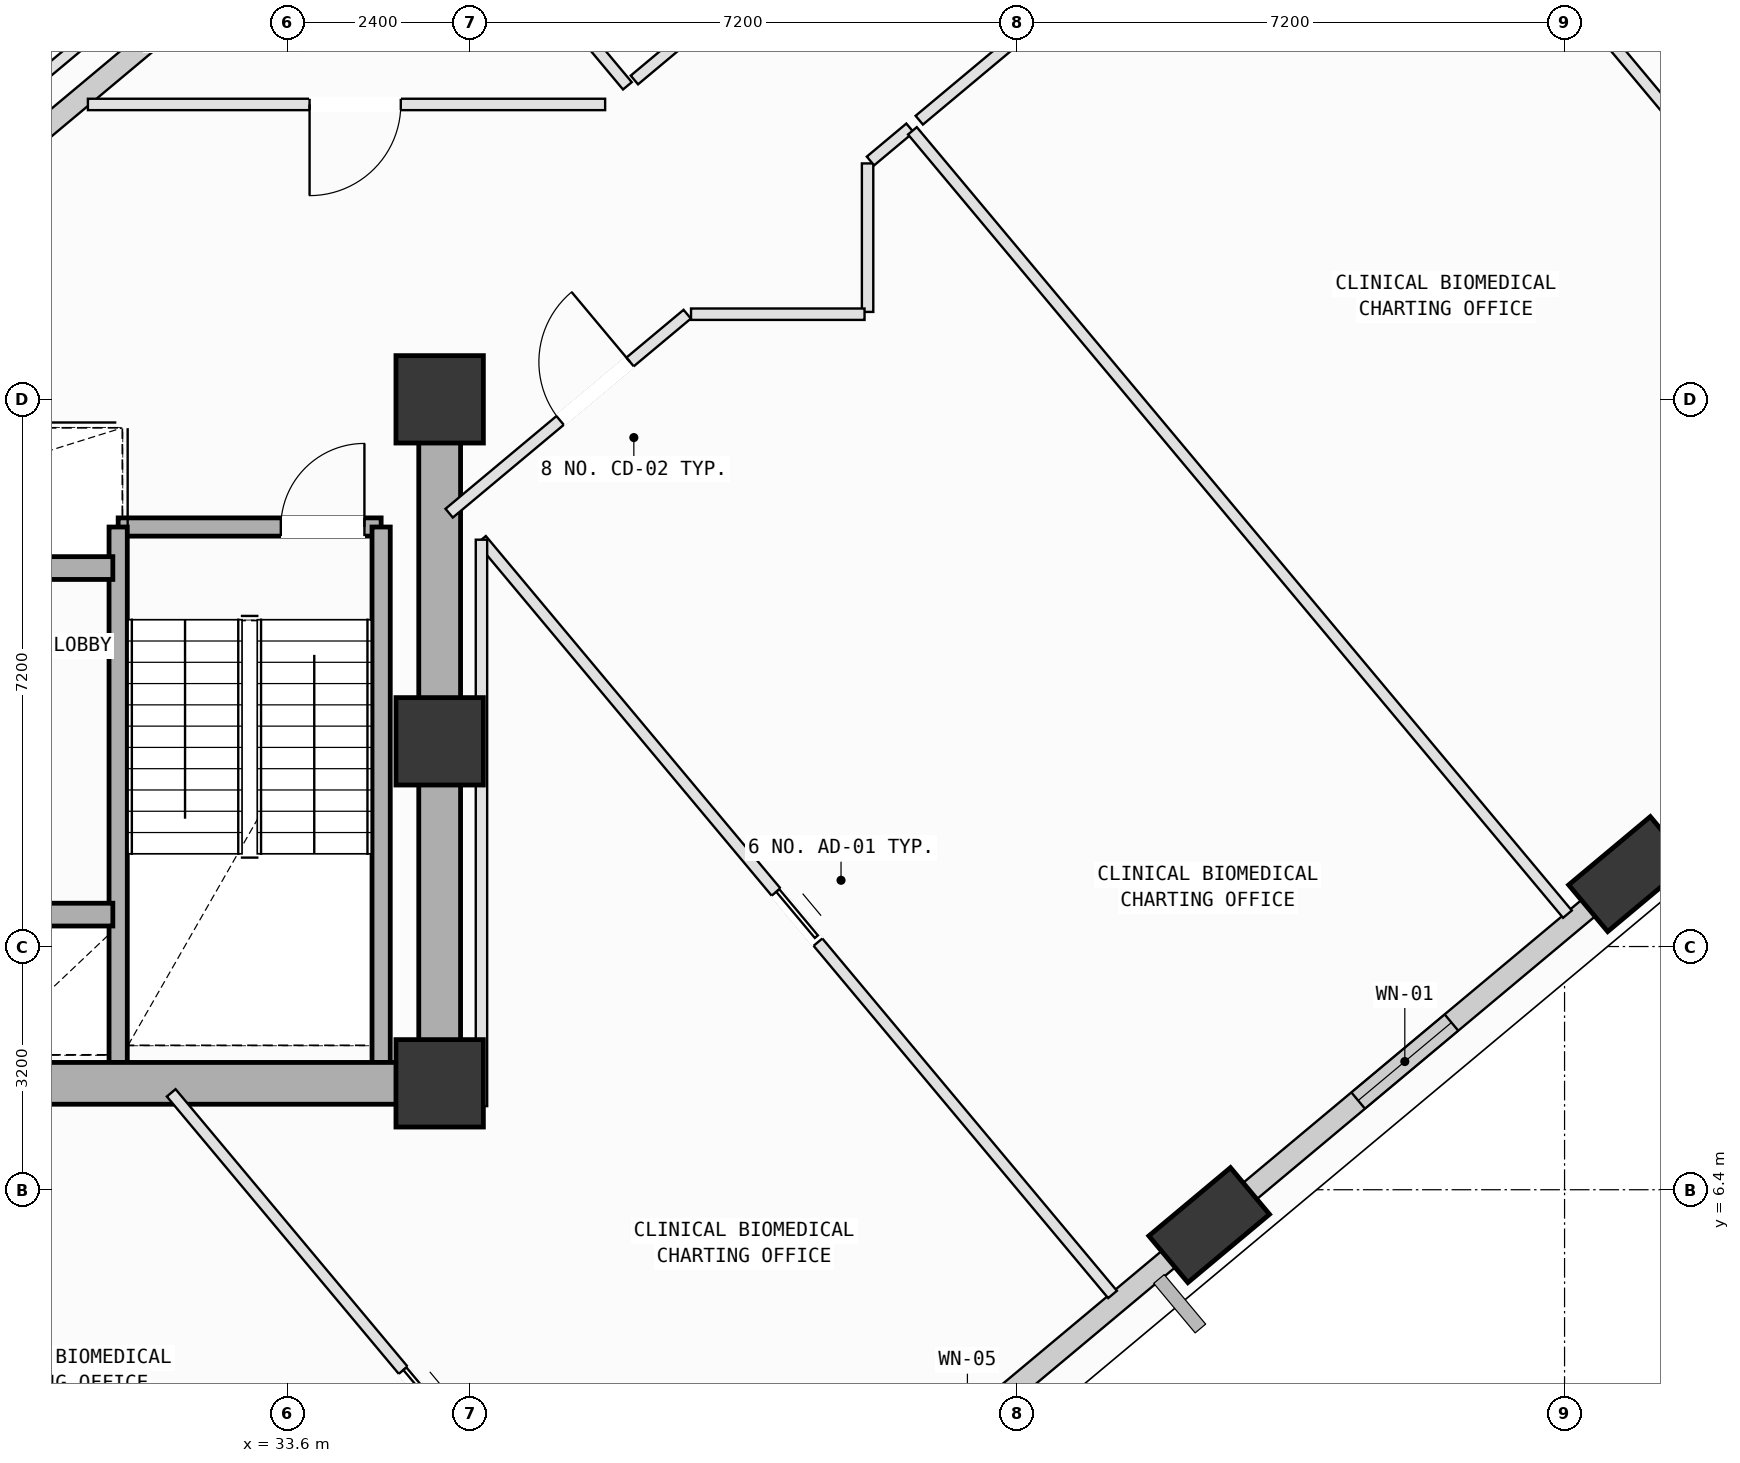
"""IFC4 building model, lengths in metres.
Left out: names, types, materials, properties, quantities, classifications, styles, units other than length and angle.
Written with IfcOpenShell. Run it as: python <this file> out.ifc"""

import sys

from ifc_helpers import new_model, si_unit, direction, frame, frame_2d, origin, origin_2d, place, context, subcontext, project, spatial, rectangle, extrude, element, fill, save


model = new_model("IFC4")
c1 = context("Model", 3, precision=1e-05, world=origin(), true_north=direction((0.0, 1.0)))
c2 = subcontext(c1, "Body", "Model", "MODEL_VIEW")
j1 = project(units=[si_unit("LENGTHUNIT", "METRE"), si_unit("PLANEANGLEUNIT", "RADIAN")], contexts=[c1])
p1 = place(None, origin())
s1 = spatial("IfcSite", under=j1, at=p1, CompositionType="ELEMENT")
p2 = place(p1, origin())
s2 = spatial("IfcBuilding", under=s1, at=p2, CompositionType="ELEMENT")
p3 = place(p2, frame((0.0, 0.0, 193.8)))
s3 = spatial("IfcBuildingStorey", under=s2, at=p3, CompositionType="ELEMENT", Elevation=193.8)
for number, where, z_axis, x_axis in (
    (1, (35.6, 7.8, 0.0), (0.0, 0.0, 1.0), (1.0, 0.0, 0.0)),
    (2, (35.6, 12.3, 0.0), (0.0, 0.0, 1.0), (1.0, 0.0, 0.0)),
    (3, (35.6, 16.8, 0.0), (0.0, 0.0, 1.0), (1.0, 0.0, 0.0)),
):
    element("IfcColumn", number, at=place(p3, frame(where, z_axis=z_axis, x_axis=x_axis)), inside=s3, PredefinedType="COLUMN", context=c2, shape_type="SweptSolid", body=[
        extrude(rectangle(XDim=1.15, YDim=1.15, at=origin_2d()), origin(), (0.0, 0.0, 1.0), 4.0),
    ])
p4 = place(p3, frame((45.724, 5.935, 0.002), z_axis=(0.077435241864, 0.050670507834, 0.995708934857), x_axis=(-0.954505911001, 0.292223987972, 0.05935997573)))
e4 = element("IfcColumn", 4, at=p4, inside=s3, PredefinedType="COLUMN", context=c2, shape_type="SweptSolid", body=[
    extrude(rectangle(XDim=1.4, YDim=0.8, at=origin_2d()), origin(), (0.0, 0.0, 1.0), 4.014),
])
p5 = place(p3, frame((51.248, 10.553, 0.002), z_axis=(0.058207280613, 0.073352121651, 0.995606035906), x_axis=(-0.99792031094, -0.023390957451, 0.060065931471)))
e5 = element("IfcColumn", 5, at=p5, inside=s3, PredefinedType="COLUMN", context=c2, shape_type="SweptSolid", body=[
    extrude(rectangle(XDim=1.4, YDim=0.8, at=origin_2d()), origin(), (0.0, 0.0, 1.0), 4.014),
])
p6 = place(p3, frame((45.486, 5.735, 0.0), z_axis=(0.0, 0.0, 1.0), x_axis=(-0.767147873107, -0.641470296107, 0.0)))
e6 = element("IfcWall", 6, at=p6, inside=s3, PredefinedType="SOLIDWALL", context=c2, shape_type="SweptSolid", body=[
    extrude(rectangle(XDim=6.214, YDim=0.28, at=frame_2d((3.107, 0.0))), origin(), (0.0, 0.0, 1.0), 3.265),
])
p7 = place(p6, frame((3.235, 0.0, 0.75)))
e7 = element("IfcOpeningElement", 7, at=p7, cuts=e6, PredefinedType="OPENING", context=c2, shape_type="SweptSolid", body=[
    extrude(rectangle(XDim=1.2, YDim=1.75, at=frame_2d((0.6, 0.875))), frame((0.0, 0.15, 0.0), z_axis=(0.0, -1.0, 0.0), x_axis=(1.0, 0.0, 0.0)), (0.0, 0.0, 1.0), 0.3),
])
p8 = place(p3, frame((51.01, 10.354, 0.0), z_axis=(0.0, 0.0, 1.0), x_axis=(-0.767179241659, -0.641432779929, 0.0)))
e8 = element("IfcWall", 8, at=p8, inside=s3, PredefinedType="SOLIDWALL", context=c2, shape_type="SweptSolid", body=[
    extrude(rectangle(XDim=6.209, YDim=0.28, at=frame_2d((3.104, 0.0))), origin(), (0.0, 0.0, 1.0), 3.265),
])
p9 = place(p8, frame((2.734, 0.0, 0.75)))
e9 = element("IfcOpeningElement", 9, at=p9, cuts=e8, PredefinedType="OPENING", context=c2, shape_type="SweptSolid", body=[
    extrude(rectangle(XDim=1.6, YDim=1.95, at=frame_2d((0.8, 0.975))), frame((0.0, 0.15, 0.0), z_axis=(0.0, -1.0, 0.0), x_axis=(1.0, 0.0, 0.0)), (0.0, 0.0, 1.0), 0.3),
])
p10 = place(p3, frame((29.828, 19.887, 0.0), z_axis=(0.0, 0.0, 1.0), x_axis=(0.767165929265, 0.641448701749, 0.0)))
e10 = element("IfcWall", 10, at=p10, inside=s3, PredefinedType="SOLIDWALL", context=c2, shape_type="SweptSolid", body=[
    extrude(rectangle(XDim=5.96, YDim=0.28, at=frame_2d((2.98, 0.0))), origin(), (0.0, 0.0, 1.0), 3.265),
])
p11 = place(p3, frame((31.37, 15.12, 0.0), z_axis=(0.0, 0.0, 1.0), x_axis=(1.0, 0.0, 0.0)))
e11 = element("IfcWall", 11, at=p11, inside=s3, PredefinedType="SOLIDWALL", context=c2, shape_type="SweptSolid", body=[
    extrude(rectangle(XDim=3.46, YDim=0.24, at=frame_2d((1.73, 0.0))), origin(), (0.0, 0.0, 1.0), 3.78),
])
p12 = place(p11, frame((2.14, 0.0, 0.0)))
e12 = element("IfcOpeningElement", 12, at=p12, cuts=e11, PredefinedType="OPENING", context=c2, shape_type="SweptSolid", body=[
    extrude(rectangle(XDim=1.1, YDim=2.15, at=frame_2d((0.55, 1.075))), frame((0.0, 0.13, 0.0), z_axis=(0.0, -1.0, 0.0), x_axis=(1.0, 0.0, 0.0)), (0.0, 0.0, 1.0), 0.26),
])
for number, where, z_axis, x_axis in (
    (13, (34.83, 15.12, 0.0), (0.0, 0.0, 1.0), (0.0, -1.0, 0.0)),
    (14, (31.37, 8.075, 0.0), (0.0, 0.0, 1.0), (0.0, 1.0, 0.0)),
):
    element("IfcWall", number, at=place(p3, frame(where, z_axis=z_axis, x_axis=x_axis)), inside=s3, PredefinedType="SOLIDWALL", context=c2, shape_type="SweptSolid", body=[
        extrude(rectangle(XDim=7.045, YDim=0.24, at=frame_2d((3.522, 0.0))), origin(), (0.0, 0.0, 1.0), 3.78),
    ])
p13 = place(p3, frame((24.8, 7.8, 0.0), z_axis=(0.0, 0.0, 1.0), x_axis=(1.0, 0.0, 0.0)))
e15 = element("IfcWall", 15, at=p13, inside=s3, PredefinedType="SHEAR", context=c2, shape_type="SweptSolid", body=[
    extrude(rectangle(XDim=10.8, YDim=0.55, at=frame_2d((5.4, 0.0))), origin(), (0.0, 0.0, 1.0), 3.78),
])
p14 = place(p3, frame((35.6, 7.8, 0.0), z_axis=(0.0, 0.0, 1.0), x_axis=(0.0, 1.0, 0.0)))
e16 = element("IfcWall", 16, at=p14, inside=s3, PredefinedType="SHEAR", context=c2, shape_type="SweptSolid", body=[
    extrude(rectangle(XDim=9.0, YDim=0.55, at=frame_2d((4.5, 0.0))), origin(), (0.0, 0.0, 1.0), 3.78),
])
p15 = place(p3, frame((29.6, 10.02, 0.0), z_axis=(0.0, 0.0, 1.0), x_axis=(1.0, 0.0, 0.0)))
e17 = element("IfcWall", 17, at=p15, inside=s3, PredefinedType="SOLIDWALL", context=c2, shape_type="SweptSolid", body=[
    extrude(rectangle(XDim=1.7, YDim=0.3, at=frame_2d((0.85, 0.0))), origin(), (0.0, 0.0, 1.0), 3.78),
])
p16 = place(p3, frame((25.85, 14.58, 0.0), z_axis=(0.0, 0.0, 1.0), x_axis=(1.0, 0.0, 0.0)))
e18 = element("IfcWall", 18, at=p16, inside=s3, PredefinedType="SOLIDWALL", context=c2, shape_type="SweptSolid", body=[
    extrude(rectangle(XDim=5.45, YDim=0.3, at=frame_2d((2.725, 0.0))), origin(), (0.0, 0.0, 1.0), 3.78),
])
p17 = place(p16, frame((0.34, 0.0, 0.0)))
e19 = element("IfcOpeningElement", 19, at=p17, cuts=e18, PredefinedType="OPENING", context=c2, shape_type="SweptSolid", body=[
    extrude(rectangle(XDim=1.12, YDim=2.15, at=frame_2d((0.56, 1.075))), frame((0.0, 0.16, 0.0), z_axis=(0.0, -1.0, 0.0), x_axis=(1.0, 0.0, 0.0)), (0.0, 0.0, 1.0), 0.32),
])
p18 = place(p16, frame((2.24, 0.0, 0.0)))
e20 = element("IfcOpeningElement", 20, at=p18, cuts=e18, PredefinedType="OPENING", context=c2, shape_type="SweptSolid", body=[
    extrude(rectangle(XDim=1.12, YDim=2.15, at=frame_2d((0.56, 1.075))), frame((0.0, 0.16, 0.0), z_axis=(0.0, -1.0, 0.0), x_axis=(1.0, 0.0, 0.0)), (0.0, 0.0, 1.0), 0.32),
])
p19 = place(p3, frame((23.836, 5.361, 0.0), z_axis=(0.0, 0.0, 1.0), x_axis=(0.641422910141, -0.767187493606, 0.0)))
e21 = element("IfcWall", 21, at=p19, inside=s3, PredefinedType="PARTITIONING", context=c2, shape_type="SweptSolid", body=[
    extrude(rectangle(XDim=13.486, YDim=0.15, at=frame_2d((6.743, 0.0))), origin(), (0.0, 0.0, 1.0), 3.78),
])
p20 = place(p19, frame((6.313, 0.0, 0.0)))
e22 = element("IfcOpeningElement", 22, at=p20, cuts=e21, PredefinedType="OPENING", context=c2, shape_type="SweptSolid", body=[
    extrude(rectangle(XDim=0.86, YDim=2.06, at=frame_2d((0.43, 1.03))), frame((0.0, 0.085, 0.0), z_axis=(0.0, -1.0, 0.0), x_axis=(1.0, 0.0, 0.0)), (0.0, 0.0, 1.0), 0.17),
])
p21 = place(p3, frame((32.068, 7.675, 0.0), z_axis=(0.0, 0.0, 1.0), x_axis=(0.641475635529, -0.767143408381, 0.0)))
e23 = element("IfcWall", 23, at=p21, inside=s3, PredefinedType="PARTITIONING", context=c2, shape_type="SweptSolid", body=[
    extrude(rectangle(XDim=9.98, YDim=0.15, at=frame_2d((4.99, 0.0))), origin(), (0.0, 0.0, 1.0), 3.78),
])
p22 = place(p21, frame((4.757, 0.0, 0.0)))
e24 = element("IfcOpeningElement", 24, at=p22, cuts=e23, PredefinedType="OPENING", context=c2, shape_type="SweptSolid", body=[
    extrude(rectangle(XDim=0.86, YDim=2.06, at=frame_2d((0.43, 1.03))), frame((0.0, 0.085, 0.0), z_axis=(0.0, -1.0, 0.0), x_axis=(1.0, 0.0, 0.0)), (0.0, 0.0, 1.0), 0.17),
])
p23 = place(p3, frame((36.15, 14.953, 0.0), z_axis=(0.0, 0.0, 1.0), x_axis=(0.641424642923, -0.767186044875, 0.0)))
e25 = element("IfcWall", 25, at=p23, inside=s3, PredefinedType="PARTITIONING", context=c2, shape_type="SweptSolid", body=[
    extrude(rectangle(XDim=12.945, YDim=0.15, at=frame_2d((6.472, 0.0))), origin(), (0.0, 0.0, 1.0), 3.78),
])
p24 = place(p23, frame((6.042, 0.0, 0.0)))
e26 = element("IfcOpeningElement", 26, at=p24, cuts=e25, PredefinedType="OPENING", context=c2, shape_type="SweptSolid", body=[
    extrude(rectangle(XDim=0.86, YDim=2.06, at=frame_2d((0.43, 1.03))), frame((0.0, 0.085, 0.0), z_axis=(0.0, -1.0, 0.0), x_axis=(1.0, 0.0, 0.0)), (0.0, 0.0, 1.0), 0.17),
])
p25 = place(p3, frame((35.6, 7.5, 0.0), z_axis=(0.0, 0.0, 1.0), x_axis=(1.0, 0.0, 0.0)))
e27 = element("IfcWall", 27, at=p25, inside=s3, PredefinedType="PARTITIONING", context=c2, shape_type="SweptSolid", body=[
    extrude(rectangle(XDim=0.55, YDim=0.15, at=frame_2d((0.275, 0.0))), origin(), (0.0, 0.0, 1.0), 3.78),
])
p26 = place(p3, frame((36.15, 7.5, 0.0), z_axis=(0.0, 0.0, 1.0), x_axis=(0.0, 1.0, 0.0)))
e28 = element("IfcWall", 28, at=p26, inside=s3, PredefinedType="PARTITIONING", context=c2, shape_type="SweptSolid", body=[
    extrude(rectangle(XDim=7.453, YDim=0.15, at=frame_2d((3.727, 0.0))), origin(), (0.0, 0.0, 1.0), 3.78),
])
p27 = place(p3, frame((41.23, 17.95, 0.0), z_axis=(0.0, 0.0, 1.0), x_axis=(0.0, 1.0, 0.0)))
e29 = element("IfcWall", 29, at=p27, inside=s3, PredefinedType="PARTITIONING", context=c2, shape_type="SweptSolid", body=[
    extrude(rectangle(XDim=1.954, YDim=0.15, at=frame_2d((0.977, 0.0))), origin(), (0.0, 0.0, 1.0), 3.78),
])
p28 = place(p3, frame((41.268, 19.936, 0.0), z_axis=(0.0, 0.0, 1.0), x_axis=(0.766980203841, 0.641670762086, 0.0)))
e30 = element("IfcWall", 30, at=p28, inside=s3, PredefinedType="PARTITIONING", context=c2, shape_type="SweptSolid", body=[
    extrude(rectangle(XDim=0.678, YDim=0.15, at=frame_2d((0.339, 0.0))), origin(), (0.0, 0.0, 1.0), 3.065),
])
p29 = place(p3, frame((41.82, 20.333, 0.0), z_axis=(0.0, 0.0, 1.0), x_axis=(0.641441854708, -0.767171654213, 0.0)))
e31 = element("IfcWall", 31, at=p29, inside=s3, PredefinedType="PARTITIONING", context=c2, shape_type="SweptSolid", body=[
    extrude(rectangle(XDim=13.435, YDim=0.15, at=frame_2d((6.718, 0.0))), origin(), (0.0, 0.0, 1.0), 3.78),
])
p30 = place(p3, frame((46.394, 6.194, 0.0), z_axis=(0.0, 0.0, 1.0), x_axis=(-0.767312502054, -0.641273361518, 0.0)))
e32 = element("IfcWall", 32, at=p30, inside=s3, PredefinedType="PARTITIONING", context=c2, shape_type="SweptSolid", body=[
    extrude(rectangle(XDim=0.992, YDim=0.15, at=frame_2d((0.496, 0.0))), origin(), (0.0, 0.0, 1.0), 3.265),
])
p31 = place(p3, frame((35.725, 15.302, 0.0), z_axis=(0.0, 0.0, 1.0), x_axis=(0.767249700724, 0.641348498664, 0.0)))
e33 = element("IfcWall", 33, at=p31, inside=s3, PredefinedType="PARTITIONING", context=c2, shape_type="SweptSolid", body=[
    extrude(rectangle(XDim=4.082, YDim=0.15, at=frame_2d((2.041, 0.0))), origin(), (0.0, 0.0, 1.0), 3.78),
])
p32 = place(p31, frame((1.902, 0.0, 0.0)))
e34 = element("IfcOpeningElement", 34, at=p32, cuts=e33, PredefinedType="OPENING", context=c2, shape_type="SweptSolid", body=[
    extrude(rectangle(XDim=1.2, YDim=2.15, at=frame_2d((0.6, 1.075))), frame((0.0, 0.085, 0.0), z_axis=(0.0, -1.0, 0.0), x_axis=(1.0, 0.0, 0.0)), (0.0, 0.0, 1.0), 0.17),
])
p33 = place(p3, frame((38.907, 17.92, 0.0), z_axis=(0.0, 0.0, 1.0), x_axis=(1.0, 0.0, 0.0)))
e35 = element("IfcWall", 35, at=p33, inside=s3, PredefinedType="PARTITIONING", context=c2, shape_type="SweptSolid", body=[
    extrude(rectangle(XDim=2.283, YDim=0.15, at=frame_2d((1.142, 0.0))), origin(), (0.0, 0.0, 1.0), 3.065),
])
p34 = place(p3, frame((41.91, 20.473, 0.0), z_axis=(0.0, 0.0, 1.0), x_axis=(0.767133193251, 0.641487851648, 0.0)))
e36 = element("IfcWall", 36, at=p34, inside=s3, PredefinedType="PARTITIONING", context=c2, shape_type="SweptSolid", body=[
    extrude(rectangle(XDim=7.64, YDim=0.15, at=frame_2d((3.82, 0.0))), origin(), (0.0, 0.0, 1.0), 3.065),
])
p35 = place(p34, frame((3.22, 0.0, 0.0)))
e37 = element("IfcOpeningElement", 37, at=p35, cuts=e36, PredefinedType="OPENING", context=c2, shape_type="SweptSolid", body=[
    extrude(rectangle(XDim=1.2, YDim=2.15, at=frame_2d((0.6, 1.075))), frame((0.0, 0.085, 0.0), z_axis=(0.0, -1.0, 0.0), x_axis=(1.0, 0.0, 0.0)), (0.0, 0.0, 1.0), 0.17),
])
p36 = place(p3, frame((47.771, 25.374, 0.0), z_axis=(0.0, 0.0, 1.0), x_axis=(0.6415100718, -0.767114611892, 0.0)))
e38 = element("IfcWall", 38, at=p36, inside=s3, PredefinedType="PARTITIONING", context=c2, shape_type="SweptSolid", body=[
    extrude(rectangle(XDim=13.486, YDim=0.15, at=frame_2d((6.743, 0.0))), origin(), (0.0, 0.0, 1.0), 3.78),
])
p37 = place(p3, frame((51.916, 10.812, 0.0), z_axis=(0.0, 0.0, 1.0), x_axis=(-0.766986359931, -0.641663403725, 0.0)))
e39 = element("IfcWall", 39, at=p37, inside=s3, PredefinedType="PARTITIONING", context=c2, shape_type="SweptSolid", body=[
    extrude(rectangle(XDim=0.99, YDim=0.15, at=frame_2d((0.495, 0.0))), origin(), (0.0, 0.0, 1.0), 3.265),
])
p38 = place(p3, frame((29.51, 20.338, 0.0), z_axis=(0.0, 0.0, 1.0), x_axis=(0.767156772748, 0.641459652688, 0.0)))
e40 = element("IfcWall", 40, at=p38, inside=s3, PredefinedType="PARTITIONING", context=c2, shape_type="SweptSolid", body=[
    extrude(rectangle(XDim=6.944, YDim=0.15, at=frame_2d((3.472, 0.0))), origin(), (0.0, 0.0, 1.0), 3.78),
])
p39 = place(p3, frame((35.264, 24.282, 0.0), z_axis=(0.0, 0.0, 1.0), x_axis=(0.641358182852, -0.767241605552, 0.0)))
e41 = element("IfcWall", 41, at=p39, inside=s3, PredefinedType="PARTITIONING", context=c2, shape_type="SweptSolid", body=[
    extrude(rectangle(XDim=4.375, YDim=0.15, at=frame_2d((2.188, 0.0))), origin(), (0.0, 0.0, 1.0), 3.78),
])
p40 = place(p3, frame((37.777, 20.68, 0.0), z_axis=(0.0, 0.0, 1.0), x_axis=(-1.0, 0.0, 0.0)))
e42 = element("IfcWall", 42, at=p40, inside=s3, PredefinedType="PARTITIONING", context=c2, shape_type="SweptSolid", body=[
    extrude(rectangle(XDim=6.805, YDim=0.15, at=frame_2d((3.403, 0.0))), origin(), (0.0, 0.0, 1.0), 3.78),
])
p41 = place(p40, frame((2.688, 0.0, 0.0)))
e43 = element("IfcOpeningElement", 43, at=p41, cuts=e42, PredefinedType="OPENING", context=c2, shape_type="SweptSolid", body=[
    extrude(rectangle(XDim=1.2, YDim=2.15, at=frame_2d((0.6, 1.075))), frame((0.0, 0.085, 0.0), z_axis=(0.0, -1.0, 0.0), x_axis=(1.0, 0.0, 0.0)), (0.0, 0.0, 1.0), 0.17),
])
p42 = place(p3, frame((46.469, 27.948, 0.0), z_axis=(0.0, 0.0, 1.0), x_axis=(-0.767146465677, -0.641471979279, 0.0)))
e44 = element("IfcWall", 44, at=p42, inside=s3, PredefinedType="PARTITIONING", context=c2, shape_type="SweptSolid", body=[
    extrude(rectangle(XDim=10.828, YDim=0.15, at=frame_2d((5.414, 0.0))), origin(), (0.0, 0.0, 1.0), 3.065),
])
p43 = place(p42, frame((4.814, 0.0, 0.0)))
e45 = element("IfcOpeningElement", 45, at=p43, cuts=e44, PredefinedType="OPENING", context=c2, shape_type="SweptSolid", body=[
    extrude(rectangle(XDim=1.2, YDim=2.15, at=frame_2d((0.6, 1.075))), frame((0.0, 0.085, 0.0), z_axis=(0.0, -1.0, 0.0), x_axis=(1.0, 0.0, 0.0)), (0.0, 0.0, 1.0), 0.17),
])
p44 = place(p9, origin())
e46 = element("IfcWindow", 46, at=p44, inside=s3, PartitioningType="SINGLE_PANEL", PredefinedType="WINDOW", context=c2, shape_type="SweptSolid", body=[
    extrude(rectangle(XDim=1.6, YDim=1.95, at=frame_2d((0.8, 0.975))), frame((0.0, 0.03, 0.0), z_axis=(0.0, -1.0, 0.0), x_axis=(1.0, 0.0, 0.0)), (0.0, 0.0, 1.0), 0.06),
])
fill(e9, e46)
p45 = place(p12, origin())
e47 = element("IfcDoor", 47, at=p45, inside=s3, OperationType="SINGLE_SWING_RIGHT", PredefinedType="DOOR", context=c2, shape_type="SweptSolid", body=[
    extrude(rectangle(XDim=1.1, YDim=2.15, at=frame_2d((0.55, 1.075))), frame((0.0, 0.025, 0.0), z_axis=(0.0, -1.0, 0.0), x_axis=(1.0, 0.0, 0.0)), (0.0, 0.0, 1.0), 0.05),
])
fill(e12, e47)
p46 = place(p32, origin())
e48 = element("IfcDoor", 48, at=p46, inside=s3, OperationType="SINGLE_SWING_RIGHT", PredefinedType="DOOR", context=c2, shape_type="SweptSolid", body=[
    extrude(rectangle(XDim=1.2, YDim=2.15, at=frame_2d((0.6, 1.075))), frame((0.0, 0.025, 0.0), z_axis=(0.0, -1.0, 0.0), x_axis=(1.0, 0.0, 0.0)), (0.0, 0.0, 1.0), 0.05),
])
fill(e34, e48)
p47 = place(p41, origin())
e49 = element("IfcDoor", 49, at=p47, inside=s3, OperationType="SINGLE_SWING_RIGHT", PredefinedType="DOOR", context=c2, shape_type="SweptSolid", body=[
    extrude(rectangle(XDim=1.2, YDim=2.15, at=frame_2d((0.6, 1.075))), frame((0.0, 0.025, 0.0), z_axis=(0.0, -1.0, 0.0), x_axis=(1.0, 0.0, 0.0)), (0.0, 0.0, 1.0), 0.05),
])
fill(e43, e49)
p48 = place(p24, origin())
e50 = element("IfcDoor", 50, at=p48, inside=s3, OperationType="SLIDING_TO_LEFT", PredefinedType="DOOR", context=c2, shape_type="SweptSolid", body=[
    extrude(rectangle(XDim=0.86, YDim=2.06, at=frame_2d((0.43, 1.03))), frame((0.0, 0.025, 0.0), z_axis=(0.0, -1.0, 0.0), x_axis=(1.0, 0.0, 0.0)), (0.0, 0.0, 1.0), 0.05),
])
fill(e26, e50)
p49 = place(p22, origin())
e51 = element("IfcDoor", 51, at=p49, inside=s3, OperationType="SLIDING_TO_LEFT", PredefinedType="DOOR", context=c2, shape_type="SweptSolid", body=[
    extrude(rectangle(XDim=0.86, YDim=2.06, at=frame_2d((0.43, 1.03))), frame((0.0, 0.025, 0.0), z_axis=(0.0, -1.0, 0.0), x_axis=(1.0, 0.0, 0.0)), (0.0, 0.0, 1.0), 0.05),
])
fill(e24, e51)
save(model, sys.argv[1])
